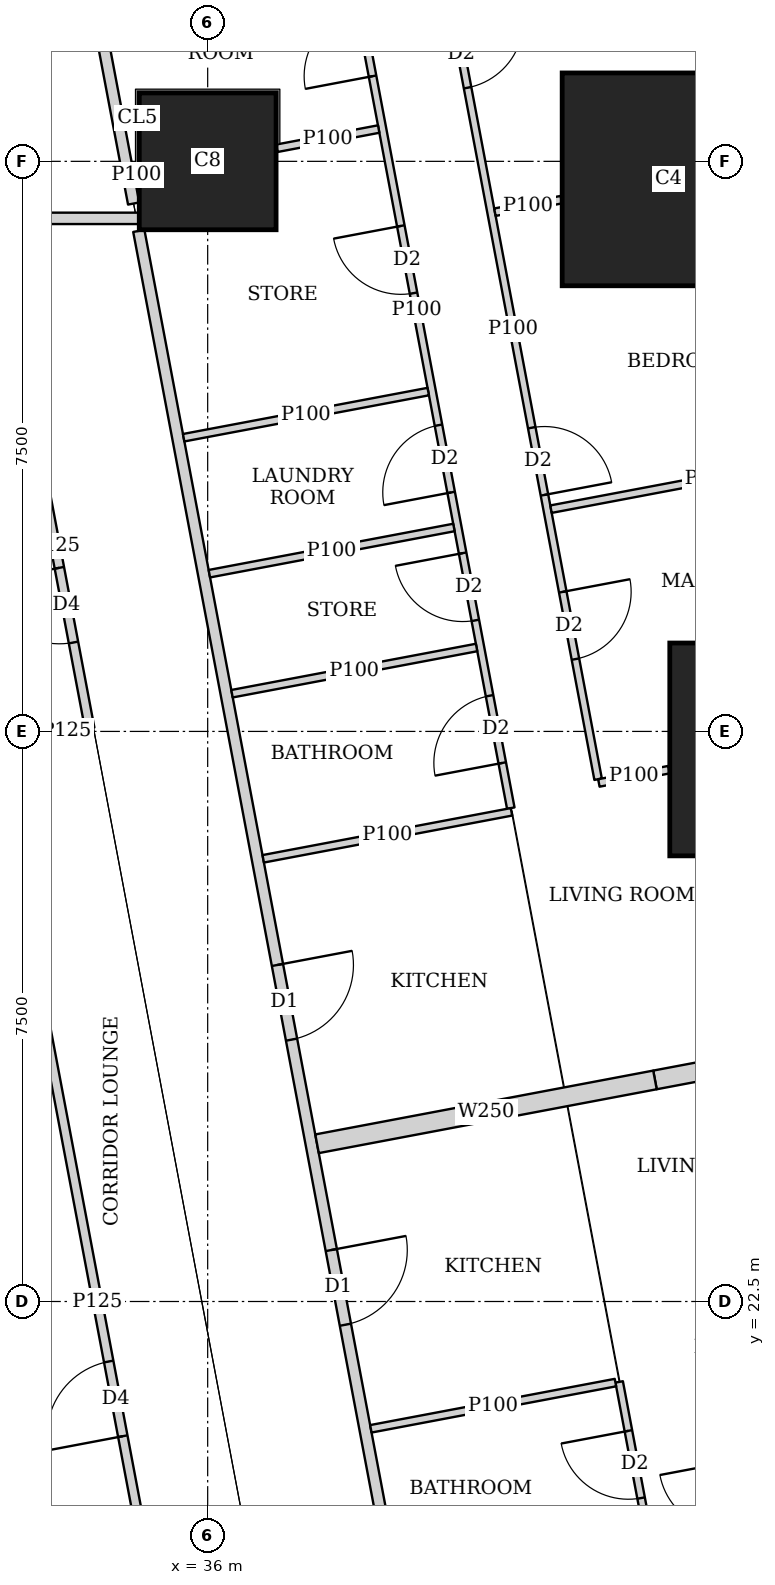
"""IFC4 building model, lengths in metres.
Left out: names, types, materials, properties, quantities, classifications, styles, units other than length and angle.
Written with IfcOpenShell. Run it as: python <this file> out.ifc"""

import sys

from ifc_helpers import new_model, si_unit, direction, frame, frame_2d, origin, origin_2d, place, context, subcontext, project, spatial, rectangle, extrude, element, fill, save


model = new_model("IFC4")
c1 = context("Model", 3, precision=1e-05, world=origin(), true_north=direction((0.0, 1.0)))
c2 = subcontext(c1, "Body", "Model", "MODEL_VIEW")
j1 = project(units=[si_unit("LENGTHUNIT", "METRE"), si_unit("PLANEANGLEUNIT", "RADIAN")], contexts=[c1])
p1 = place(None, origin())
s1 = spatial("IfcSite", under=j1, at=p1, CompositionType="ELEMENT")
p2 = place(p1, origin())
s2 = spatial("IfcBuilding", under=s1, at=p2, CompositionType="ELEMENT")
p3 = place(p2, frame((0.0, 0.0, 53.75)))
s3 = spatial("IfcBuildingStorey", under=s2, at=p3, CompositionType="ELEMENT", Elevation=53.75)
p4 = place(p3, frame((43.48, 29.763, 0.0), z_axis=(0.0, 0.0, 1.0), x_axis=(1.0, 0.0, 0.0)))
e1 = element("IfcColumn", 1, at=p4, inside=s3, PredefinedType="COLUMN", context=c2, shape_type="SweptSolid", body=[
    extrude(rectangle(XDim=2.8, YDim=2.8, at=origin_2d()), origin(), (0.0, 0.0, 1.0), 3.75),
])
p5 = place(p3, frame((36.0, 37.5, 0.0), z_axis=(0.0, 0.0, 1.0), x_axis=(1.0, 0.0, 0.0)))
e2 = element("IfcColumn", 2, at=p5, inside=s3, PredefinedType="COLUMN", context=c2, shape_type="SweptSolid", body=[
    extrude(rectangle(XDim=1.8, YDim=1.8, at=origin_2d()), origin(), (0.0, 0.0, 1.0), 3.75),
])
p6 = place(p3, frame((42.064, 37.263, 0.0), z_axis=(0.0, 0.0, 1.0), x_axis=(1.0, 0.0, 0.0)))
e3 = element("IfcColumn", 3, at=p6, inside=s3, PredefinedType="COLUMN", context=c2, shape_type="SweptSolid", body=[
    extrude(rectangle(XDim=2.8, YDim=2.8, at=origin_2d()), origin(), (0.0, 0.0, 1.0), 3.75),
])
p7 = place(p3, frame((29.701, 36.75, 0.0), z_axis=(0.0, 0.0, 1.0), x_axis=(1.0, 0.0, 0.0)))
e4 = element("IfcWall", 4, at=p7, inside=s3, PredefinedType="SOLIDWALL", context=c2, shape_type="SweptSolid", body=[
    extrude(rectangle(XDim=5.399, YDim=0.15, at=frame_2d((2.7, 0.0))), origin(), (0.0, 0.0, 1.0), 3.5),
])
p8 = place(p7, frame((2.745, 0.0, 0.0)))
e5 = element("IfcOpeningElement", 5, at=p8, cuts=e4, PredefinedType="OPENING", context=c2, shape_type="SweptSolid", body=[
    extrude(rectangle(XDim=1.0, YDim=2.1, at=frame_2d((0.5, 1.05))), frame((0.0, 0.085, 0.0), z_axis=(0.0, -1.0, 0.0), x_axis=(1.0, 0.0, 0.0)), (0.0, 0.0, 1.0), 0.17),
])
p9 = place(p3, frame((33.933, 42.73, 0.0), z_axis=(0.0, 0.0, 1.0), x_axis=(0.185617897238, -0.982622000682, 0.0)))
e6 = element("IfcWall", 6, at=p9, inside=s3, PredefinedType="SOLIDWALL", context=c2, shape_type="SweptSolid", body=[
    extrude(rectangle(XDim=5.887, YDim=0.15, at=frame_2d((2.944, 0.0))), origin(), (0.0, 0.0, 1.0), 3.5),
])
p10 = place(p3, frame((35.094, 36.585, 0.0), z_axis=(0.0, 0.0, 1.0), x_axis=(0.185588860311, -0.982627485331, 0.0)))
e7 = element("IfcWall", 7, at=p10, inside=s3, PredefinedType="SOLIDWALL", context=c2, shape_type="SweptSolid", body=[
    extrude(rectangle(XDim=34.797, YDim=0.15, at=frame_2d((17.399, 0.0))), origin(), (0.0, 0.0, 1.0), 2.5),
])
p11 = place(p10, frame((9.828, 0.0, 0.0)))
e8 = element("IfcOpeningElement", 8, at=p11, cuts=e7, PredefinedType="OPENING", context=c2, shape_type="SweptSolid", body=[
    extrude(rectangle(XDim=1.0, YDim=2.1, at=frame_2d((0.5, 1.05))), frame((0.0, 0.085, 0.0), z_axis=(0.0, -1.0, 0.0), x_axis=(1.0, 0.0, 0.0)), (0.0, 0.0, 1.0), 0.17),
])
p12 = place(p10, frame((13.645, 0.0, 0.0)))
e9 = element("IfcOpeningElement", 9, at=p12, cuts=e7, PredefinedType="OPENING", context=c2, shape_type="SweptSolid", body=[
    extrude(rectangle(XDim=1.0, YDim=2.1, at=frame_2d((0.5, 1.05))), frame((0.0, 0.085, 0.0), z_axis=(0.0, -1.0, 0.0), x_axis=(1.0, 0.0, 0.0)), (0.0, 0.0, 1.0), 0.17),
])
p13 = place(p10, frame((25.9, 0.0, 0.0)))
e10 = element("IfcOpeningElement", 10, at=p13, cuts=e7, PredefinedType="OPENING", context=c2, shape_type="SweptSolid", body=[
    extrude(rectangle(XDim=1.0, YDim=2.1, at=frame_2d((0.5, 1.05))), frame((0.0, 0.085, 0.0), z_axis=(0.0, -1.0, 0.0), x_axis=(1.0, 0.0, 0.0)), (0.0, 0.0, 1.0), 0.17),
])
p14 = place(p3, frame((38.9, 41.22, 0.0), z_axis=(0.0, 0.0, 1.0), x_axis=(0.185521843026, -0.98264014052, 0.0)))
e11 = element("IfcWall", 11, at=p14, inside=s3, PredefinedType="PARTITIONING", context=c2, shape_type="SweptSolid", body=[
    extrude(rectangle(XDim=12.058, YDim=0.1, at=frame_2d((6.029, 0.0))), origin(), (0.0, 0.0, 1.0), 2.5),
])
p15 = place(p14, frame((9.55, 0.0, 0.0)))
e12 = element("IfcOpeningElement", 12, at=p15, cuts=e11, PredefinedType="OPENING", context=c2, shape_type="SweptSolid", body=[
    extrude(rectangle(XDim=0.9, YDim=2.1, at=frame_2d((0.45, 1.05))), frame((0.0, 0.06, 0.0), z_axis=(0.0, -1.0, 0.0), x_axis=(1.0, 0.0, 0.0)), (0.0, 0.0, 1.0), 0.12),
])
p16 = place(p14, frame((7.352, 0.0, 0.0)))
e13 = element("IfcOpeningElement", 13, at=p16, cuts=e11, PredefinedType="OPENING", context=c2, shape_type="SweptSolid", body=[
    extrude(rectangle(XDim=0.9, YDim=2.1, at=frame_2d((0.45, 1.05))), frame((0.0, 0.06, 0.0), z_axis=(0.0, -1.0, 0.0), x_axis=(1.0, 0.0, 0.0)), (0.0, 0.0, 1.0), 0.12),
])
p17 = place(p14, frame((1.9, 0.0, 0.0)))
e14 = element("IfcOpeningElement", 14, at=p17, cuts=e11, PredefinedType="OPENING", context=c2, shape_type="SweptSolid", body=[
    extrude(rectangle(XDim=0.9, YDim=2.1, at=frame_2d((0.45, 1.05))), frame((0.0, 0.06, 0.0), z_axis=(0.0, -1.0, 0.0), x_axis=(1.0, 0.0, 0.0)), (0.0, 0.0, 1.0), 0.12),
])
p18 = place(p3, frame((37.514, 42.089, 0.0), z_axis=(0.0, 0.0, 1.0), x_axis=(0.1856087397, -0.982623730503, 0.0)))
e15 = element("IfcWall", 15, at=p18, inside=s3, PredefinedType="PARTITIONING", context=c2, shape_type="SweptSolid", body=[
    extrude(rectangle(XDim=13.33, YDim=0.1, at=frame_2d((6.665, 0.0))), origin(), (0.0, 0.0, 1.0), 2.5),
])
p19 = place(p18, frame((11.825, 0.0, 0.0)))
e16 = element("IfcOpeningElement", 16, at=p19, cuts=e15, PredefinedType="OPENING", context=c2, shape_type="SweptSolid", body=[
    extrude(rectangle(XDim=0.9, YDim=2.1, at=frame_2d((0.45, 1.05))), frame((0.0, 0.06, 0.0), z_axis=(0.0, -1.0, 0.0), x_axis=(1.0, 0.0, 0.0)), (0.0, 0.0, 1.0), 0.12),
])
p20 = place(p18, frame((8.203, 0.0, 0.0)))
e17 = element("IfcOpeningElement", 17, at=p20, cuts=e15, PredefinedType="OPENING", context=c2, shape_type="SweptSolid", body=[
    extrude(rectangle(XDim=0.9, YDim=2.1, at=frame_2d((0.45, 1.05))), frame((0.0, 0.06, 0.0), z_axis=(0.0, -1.0, 0.0), x_axis=(1.0, 0.0, 0.0)), (0.0, 0.0, 1.0), 0.12),
])
p21 = place(p18, frame((2.63, 0.0, 0.0)))
e18 = element("IfcOpeningElement", 18, at=p21, cuts=e15, PredefinedType="OPENING", context=c2, shape_type="SweptSolid", body=[
    extrude(rectangle(XDim=0.9, YDim=2.1, at=frame_2d((0.45, 1.05))), frame((0.0, 0.06, 0.0), z_axis=(0.0, -1.0, 0.0), x_axis=(1.0, 0.0, 0.0)), (0.0, 0.0, 1.0), 0.12),
])
p22 = place(p18, frame((9.916, 0.0, 0.0)))
e19 = element("IfcOpeningElement", 19, at=p22, cuts=e15, PredefinedType="OPENING", context=c2, shape_type="SweptSolid", body=[
    extrude(rectangle(XDim=0.9, YDim=2.1, at=frame_2d((0.45, 1.05))), frame((0.0, 0.06, 0.0), z_axis=(0.0, -1.0, 0.0), x_axis=(1.0, 0.0, 0.0)), (0.0, 0.0, 1.0), 0.12),
])
p23 = place(p18, frame((5.535, 0.0, 0.0)))
e20 = element("IfcOpeningElement", 20, at=p23, cuts=e15, PredefinedType="OPENING", context=c2, shape_type="SweptSolid", body=[
    extrude(rectangle(XDim=0.9, YDim=2.1, at=frame_2d((0.45, 1.05))), frame((0.0, 0.06, 0.0), z_axis=(0.0, -1.0, 0.0), x_axis=(1.0, 0.0, 0.0)), (0.0, 0.0, 1.0), 0.12),
])
p24 = place(p3, frame((40.654, 36.996, 0.0), z_axis=(0.0, 0.0, 1.0), x_axis=(-0.982672962335, -0.185347913655, 0.0)))
e21 = element("IfcWall", 21, at=p24, inside=s3, PredefinedType="PARTITIONING", context=c2, shape_type="SweptSolid", body=[
    extrude(rectangle(XDim=0.89, YDim=0.1, at=frame_2d((0.445, 0.0))), origin(), (0.0, 0.0, 1.0), 3.5),
])
p25 = place(p3, frame((44.693, 33.713, 0.0), z_axis=(0.0, 0.0, 1.0), x_axis=(-0.982623519589, -0.185609856287, 0.0)))
e22 = element("IfcWall", 22, at=p25, inside=s3, PredefinedType="PARTITIONING", context=c2, shape_type="SweptSolid", body=[
    extrude(rectangle(XDim=4.25, YDim=0.1, at=frame_2d((2.125, 0.0))), origin(), (0.0, 0.0, 1.0), 2.05),
])
p26 = place(p3, frame((42.07, 29.497, 0.0), z_axis=(0.0, 0.0, 1.0), x_axis=(-0.982490624992, -0.186312028067, 0.0)))
e23 = element("IfcWall", 23, at=p26, inside=s3, PredefinedType="PARTITIONING", context=c2, shape_type="SweptSolid", body=[
    extrude(rectangle(XDim=0.939, YDim=0.1, at=frame_2d((0.47, 0.0))), origin(), (0.0, 0.0, 1.0), 2.5),
])
p27 = place(p3, frame((38.25, 37.925, 0.0), z_axis=(0.0, 0.0, 1.0), x_axis=(-0.982650574676, -0.185466568658, 0.0)))
e24 = element("IfcWall", 24, at=p27, inside=s3, PredefinedType="PARTITIONING", context=c2, shape_type="SweptSolid", body=[
    extrude(rectangle(XDim=1.364, YDim=0.1, at=frame_2d((0.682, 0.0))), origin(), (0.0, 0.0, 1.0), 3.5),
])
p28 = place(p3, frame((35.09, 37.328, 0.0), z_axis=(0.0, 0.0, 1.0), x_axis=(-0.982590620415, -0.185783940835, 0.0)))
e25 = element("IfcWall", 25, at=p28, inside=s3, PredefinedType="PARTITIONING", context=c2, shape_type="SweptSolid", body=[
    extrude(rectangle(XDim=0.059, YDim=0.1, at=frame_2d((0.03, 0.0))), origin(), (0.0, 0.0, 1.0), 3.5),
])
p29 = place(p3, frame((39.24, 32.683, 0.0), z_axis=(0.0, 0.0, 1.0), x_axis=(-0.982607026909, -0.185697147715, 0.0)))
e26 = element("IfcWall", 26, at=p29, inside=s3, PredefinedType="PARTITIONING", context=c2, shape_type="SweptSolid", body=[
    extrude(rectangle(XDim=3.275, YDim=0.1, at=frame_2d((1.637, 0.0))), origin(), (0.0, 0.0, 1.0), 3.5),
])
p30 = place(p3, frame((39.997, 28.942, 0.0), z_axis=(0.0, 0.0, 1.0), x_axis=(-0.982569883123, -0.185893584556, 0.0)))
e27 = element("IfcWall", 27, at=p30, inside=s3, PredefinedType="PARTITIONING", context=c2, shape_type="SweptSolid", body=[
    extrude(rectangle(XDim=3.324, YDim=0.1, at=frame_2d((1.662, 0.0))), origin(), (0.0, 0.0, 1.0), 3.5),
])
p31 = place(p3, frame((39.538, 31.104, 0.0), z_axis=(0.0, 0.0, 1.0), x_axis=(-0.982620626894, -0.185625169636, 0.0)))
e28 = element("IfcWall", 28, at=p31, inside=s3, PredefinedType="PARTITIONING", context=c2, shape_type="SweptSolid", body=[
    extrude(rectangle(XDim=3.275, YDim=0.1, at=frame_2d((1.637, 0.0))), origin(), (0.0, 0.0, 1.0), 2.5),
])
p32 = place(p3, frame((38.902, 34.471, 0.0), z_axis=(0.0, 0.0, 1.0), x_axis=(-0.982674977865, -0.185337227447, 0.0)))
e29 = element("IfcWall", 29, at=p32, inside=s3, PredefinedType="PARTITIONING", context=c2, shape_type="SweptSolid", body=[
    extrude(rectangle(XDim=3.275, YDim=0.1, at=frame_2d((1.637, 0.0))), origin(), (0.0, 0.0, 1.0), 3.5),
])
p33 = place(p3, frame((41.414, 21.442, 0.0), z_axis=(0.0, 0.0, 1.0), x_axis=(0.185605379031, -0.982624365297, 0.0)))
e30 = element("IfcWall", 30, at=p33, inside=s3, PredefinedType="PARTITIONING", context=c2, shape_type="SweptSolid", body=[
    extrude(rectangle(XDim=5.63, YDim=0.1, at=frame_2d((2.815, 0.0))), origin(), (0.0, 0.0, 1.0), 3.5),
])
p34 = place(p33, frame((0.655, 0.0, 0.0)))
e31 = element("IfcOpeningElement", 31, at=p34, cuts=e30, PredefinedType="OPENING", context=c2, shape_type="SweptSolid", body=[
    extrude(rectangle(XDim=0.9, YDim=2.1, at=frame_2d((0.45, 1.05))), frame((0.0, 0.06, 0.0), z_axis=(0.0, -1.0, 0.0), x_axis=(1.0, 0.0, 0.0)), (0.0, 0.0, 1.0), 0.12),
])
p35 = place(p33, frame((4.58, 0.0, 0.0)))
e32 = element("IfcOpeningElement", 32, at=p35, cuts=e30, PredefinedType="OPENING", context=c2, shape_type="SweptSolid", body=[
    extrude(rectangle(XDim=0.9, YDim=2.1, at=frame_2d((0.45, 1.05))), frame((0.0, 0.06, 0.0), z_axis=(0.0, -1.0, 0.0), x_axis=(1.0, 0.0, 0.0)), (0.0, 0.0, 1.0), 0.12),
])
p36 = place(p33, frame((2.562, 0.0, 0.0)))
e33 = element("IfcOpeningElement", 33, at=p36, cuts=e30, PredefinedType="OPENING", context=c2, shape_type="SweptSolid", body=[
    extrude(rectangle(XDim=0.9, YDim=2.1, at=frame_2d((0.45, 1.05))), frame((0.0, 0.06, 0.0), z_axis=(0.0, -1.0, 0.0), x_axis=(1.0, 0.0, 0.0)), (0.0, 0.0, 1.0), 0.12),
])
p37 = place(p3, frame((41.365, 21.433, 0.0), z_axis=(0.0, 0.0, 1.0), x_axis=(-0.982607026909, -0.185697147715, 0.0)))
e34 = element("IfcWall", 34, at=p37, inside=s3, PredefinedType="PARTITIONING", context=c2, shape_type="SweptSolid", body=[
    extrude(rectangle(XDim=3.275, YDim=0.1, at=frame_2d((1.637, 0.0))), origin(), (0.0, 0.0, 1.0), 3.5),
])
p38 = place(p3, frame((46.11, 26.213, 0.0), z_axis=(0.0, 0.0, 1.0), x_axis=(-0.982633535512, -0.185556823879, 0.0)))
e35 = element("IfcWall", 35, at=p38, inside=s3, PredefinedType="SOLIDWALL", context=c2, shape_type="SweptSolid", body=[
    extrude(rectangle(XDim=4.3, YDim=0.25, at=frame_2d((2.15, 0.0))), origin(), (0.0, 0.0, 1.0), 2.05),
])
p39 = place(p3, frame((41.885, 25.415, 0.0), z_axis=(0.0, 0.0, 1.0), x_axis=(-0.982612837616, -0.185666398014, 0.0)))
e36 = element("IfcWall", 36, at=p39, inside=s3, PredefinedType="SOLIDWALL", context=c2, shape_type="SweptSolid", body=[
    extrude(rectangle(XDim=4.525, YDim=0.25, at=frame_2d((2.262, 0.0))), origin(), (0.0, 0.0, 1.0), 3.5),
])
p40 = place(p3, frame((34.448, 30.04, 0.0), z_axis=(0.0, 0.0, 1.0), x_axis=(-0.185749459238, 0.982597139418, 0.0)))
e37 = element("IfcWall", 37, at=p40, inside=s3, PredefinedType="PARTITIONING", context=c2, shape_type="SweptSolid", body=[
    extrude(rectangle(XDim=4.883, YDim=0.125, at=frame_2d((2.441, 0.0))), origin(), (0.0, 0.0, 1.0), 2.5),
])
p41 = place(p40, frame((1.15, 0.0, 0.0)))
e38 = element("IfcOpeningElement", 38, at=p41, cuts=e37, PredefinedType="OPENING", context=c2, shape_type="SweptSolid", body=[
    extrude(rectangle(XDim=1.0, YDim=2.1, at=frame_2d((0.5, 1.05))), frame((0.0, 0.073, 0.0), z_axis=(0.0, -1.0, 0.0), x_axis=(1.0, 0.0, 0.0)), (0.0, 0.0, 1.0), 0.145),
])
p42 = place(p40, frame((3.225, 0.0, 0.0)))
e39 = element("IfcOpeningElement", 39, at=p42, cuts=e37, PredefinedType="OPENING", context=c2, shape_type="SweptSolid", body=[
    extrude(rectangle(XDim=1.0, YDim=2.1, at=frame_2d((0.5, 1.05))), frame((0.0, 0.073, 0.0), z_axis=(0.0, -1.0, 0.0), x_axis=(1.0, 0.0, 0.0)), (0.0, 0.0, 1.0), 0.145),
])
p43 = place(p3, frame((35.793, 15.913, 0.0), z_axis=(0.0, 0.0, 1.0), x_axis=(-0.185651708232, 0.982615613162, 0.0)))
e40 = element("IfcWall", 40, at=p43, inside=s3, PredefinedType="PARTITIONING", context=c2, shape_type="SweptSolid", body=[
    extrude(rectangle(XDim=13.407, YDim=0.125, at=frame_2d((6.704, 0.0))), origin(), (0.0, 0.0, 1.0), 2.5),
])
p44 = place(p43, frame((4.9, 0.0, 0.0)))
e41 = element("IfcOpeningElement", 41, at=p44, cuts=e40, PredefinedType="OPENING", context=c2, shape_type="SweptSolid", body=[
    extrude(rectangle(XDim=1.0, YDim=2.1, at=frame_2d((0.5, 1.05))), frame((0.0, 0.073, 0.0), z_axis=(0.0, -1.0, 0.0), x_axis=(1.0, 0.0, 0.0)), (0.0, 0.0, 1.0), 0.145),
])
p45 = place(p3, frame((33.901, 30.0, 0.0), z_axis=(0.0, 0.0, 1.0), x_axis=(1.0, 0.0, 0.0)))
e42 = element("IfcWall", 42, at=p45, inside=s3, PredefinedType="PARTITIONING", context=c2, shape_type="SweptSolid", body=[
    extrude(rectangle(XDim=0.479, YDim=0.125, at=frame_2d((0.24, 0.0))), origin(), (0.0, 0.0, 1.0), 2.5),
])
p46 = place(p15, origin())
e43 = element("IfcDoor", 43, at=p46, inside=s3, OperationType="SINGLE_SWING_LEFT", PredefinedType="DOOR", context=c2, shape_type="SweptSolid", body=[
    extrude(rectangle(XDim=0.9, YDim=2.1, at=frame_2d((0.45, 1.05))), frame((0.0, 0.025, 0.0), z_axis=(0.0, -1.0, 0.0), x_axis=(1.0, 0.0, 0.0)), (0.0, 0.0, 1.0), 0.05),
])
fill(e12, e43)
p47 = place(p16, origin())
e44 = element("IfcDoor", 44, at=p47, inside=s3, OperationType="SINGLE_SWING_RIGHT", PredefinedType="DOOR", context=c2, shape_type="SweptSolid", body=[
    extrude(rectangle(XDim=0.9, YDim=2.1, at=frame_2d((0.45, 1.05))), frame((0.0, 0.025, 0.0), z_axis=(0.0, -1.0, 0.0), x_axis=(1.0, 0.0, 0.0)), (0.0, 0.0, 1.0), 0.05),
])
fill(e13, e44)
p48 = place(p17, origin())
e45 = element("IfcDoor", 45, at=p48, inside=s3, OperationType="SINGLE_SWING_LEFT", PredefinedType="DOOR", context=c2, shape_type="SweptSolid", body=[
    extrude(rectangle(XDim=0.9, YDim=2.1, at=frame_2d((0.45, 1.05))), frame((0.0, 0.025, 0.0), z_axis=(0.0, -1.0, 0.0), x_axis=(1.0, 0.0, 0.0)), (0.0, 0.0, 1.0), 0.05),
])
fill(e14, e45)
p49 = place(p19, origin())
e46 = element("IfcDoor", 46, at=p49, inside=s3, OperationType="SINGLE_SWING_LEFT", PredefinedType="DOOR", context=c2, shape_type="SweptSolid", body=[
    extrude(rectangle(XDim=0.9, YDim=2.1, at=frame_2d((0.45, 1.05))), frame((0.0, 0.025, 0.0), z_axis=(0.0, -1.0, 0.0), x_axis=(1.0, 0.0, 0.0)), (0.0, 0.0, 1.0), 0.05),
])
fill(e16, e46)
p50 = place(p20, origin())
e47 = element("IfcDoor", 47, at=p50, inside=s3, OperationType="SINGLE_SWING_LEFT", PredefinedType="DOOR", context=c2, shape_type="SweptSolid", body=[
    extrude(rectangle(XDim=0.9, YDim=2.1, at=frame_2d((0.45, 1.05))), frame((0.0, 0.025, 0.0), z_axis=(0.0, -1.0, 0.0), x_axis=(1.0, 0.0, 0.0)), (0.0, 0.0, 1.0), 0.05),
])
fill(e17, e47)
p51 = place(p21, origin())
e48 = element("IfcDoor", 48, at=p51, inside=s3, OperationType="SINGLE_SWING_LEFT", PredefinedType="DOOR", context=c2, shape_type="SweptSolid", body=[
    extrude(rectangle(XDim=0.9, YDim=2.1, at=frame_2d((0.45, 1.05))), frame((0.0, 0.025, 0.0), z_axis=(0.0, -1.0, 0.0), x_axis=(1.0, 0.0, 0.0)), (0.0, 0.0, 1.0), 0.05),
])
fill(e18, e48)
p52 = place(p22, origin())
e49 = element("IfcDoor", 49, at=p52, inside=s3, OperationType="SINGLE_SWING_RIGHT", PredefinedType="DOOR", context=c2, shape_type="SweptSolid", body=[
    extrude(rectangle(XDim=0.9, YDim=2.1, at=frame_2d((0.45, 1.05))), frame((0.0, 0.025, 0.0), z_axis=(0.0, -1.0, 0.0), x_axis=(1.0, 0.0, 0.0)), (0.0, 0.0, 1.0), 0.05),
])
fill(e19, e49)
p53 = place(p23, origin())
e50 = element("IfcDoor", 50, at=p53, inside=s3, OperationType="SINGLE_SWING_RIGHT", PredefinedType="DOOR", context=c2, shape_type="SweptSolid", body=[
    extrude(rectangle(XDim=0.9, YDim=2.1, at=frame_2d((0.45, 1.05))), frame((0.0, 0.025, 0.0), z_axis=(0.0, -1.0, 0.0), x_axis=(1.0, 0.0, 0.0)), (0.0, 0.0, 1.0), 0.05),
])
fill(e20, e50)
p54 = place(p11, origin())
e51 = element("IfcDoor", 51, at=p54, inside=s3, OperationType="SINGLE_SWING_LEFT", PredefinedType="DOOR", context=c2, shape_type="SweptSolid", body=[
    extrude(rectangle(XDim=1.0, YDim=2.1, at=frame_2d((0.5, 1.05))), frame((0.0, 0.025, 0.0), z_axis=(0.0, -1.0, 0.0), x_axis=(1.0, 0.0, 0.0)), (0.0, 0.0, 1.0), 0.05),
])
fill(e8, e51)
p55 = place(p34, origin())
e52 = element("IfcDoor", 52, at=p55, inside=s3, OperationType="SINGLE_SWING_RIGHT", PredefinedType="DOOR", context=c2, shape_type="SweptSolid", body=[
    extrude(rectangle(XDim=0.9, YDim=2.1, at=frame_2d((0.45, 1.05))), frame((0.0, 0.025, 0.0), z_axis=(0.0, -1.0, 0.0), x_axis=(1.0, 0.0, 0.0)), (0.0, 0.0, 1.0), 0.05),
])
fill(e31, e52)
p56 = place(p12, origin())
e53 = element("IfcDoor", 53, at=p56, inside=s3, OperationType="SINGLE_SWING_LEFT", PredefinedType="DOOR", context=c2, shape_type="SweptSolid", body=[
    extrude(rectangle(XDim=1.0, YDim=2.1, at=frame_2d((0.5, 1.05))), frame((0.0, 0.025, 0.0), z_axis=(0.0, -1.0, 0.0), x_axis=(1.0, 0.0, 0.0)), (0.0, 0.0, 1.0), 0.05),
])
fill(e9, e53)
p57 = place(p44, origin())
e54 = element("IfcDoor", 54, at=p57, inside=s3, OperationType="SINGLE_SWING_LEFT", PredefinedType="DOOR", context=c2, shape_type="SweptSolid", body=[
    extrude(rectangle(XDim=1.0, YDim=2.1, at=frame_2d((0.5, 1.05))), frame((0.0, 0.025, 0.0), z_axis=(0.0, -1.0, 0.0), x_axis=(1.0, 0.0, 0.0)), (0.0, 0.0, 1.0), 0.05),
])
fill(e41, e54)
p58 = place(p41, origin())
e55 = element("IfcDoor", 55, at=p58, inside=s3, OperationType="SINGLE_SWING_RIGHT", PredefinedType="DOOR", context=c2, shape_type="SweptSolid", body=[
    extrude(rectangle(XDim=1.0, YDim=2.1, at=frame_2d((0.5, 1.05))), frame((0.0, 0.025, 0.0), z_axis=(0.0, -1.0, 0.0), x_axis=(1.0, 0.0, 0.0)), (0.0, 0.0, 1.0), 0.05),
])
fill(e38, e55)
save(model, sys.argv[1])
